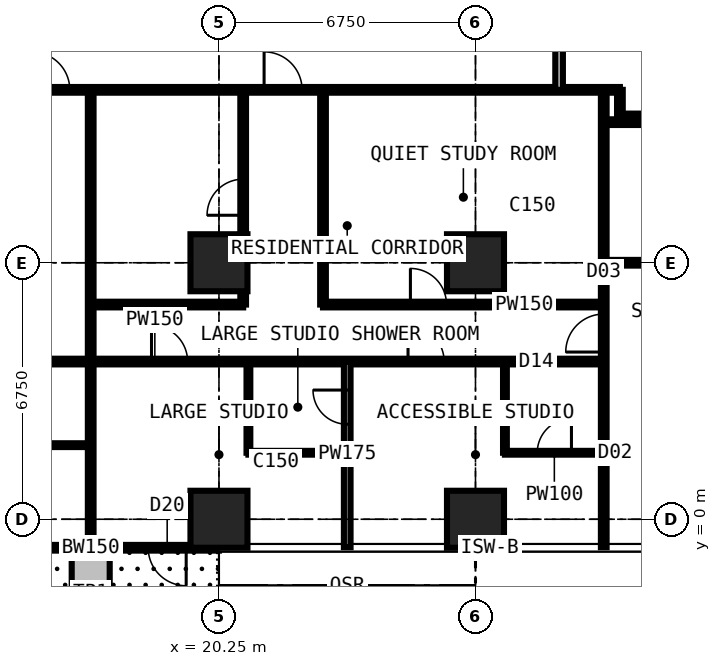
"""IFC4 building model, lengths in metres.
Left out: names, types, materials, properties, quantities, classifications, styles, units other than length and angle.
Written with IfcOpenShell. Run it as: python <this file> out.ifc"""

import sys

from ifc_helpers import new_model, si_unit, direction, frame, frame_2d, origin, origin_2d, place, context, subcontext, project, spatial, rectangle, extrude, element, fill, save


model = new_model("IFC4")
c1 = context("Model", 3, precision=1e-05, world=origin(), true_north=direction((0.0, 1.0)))
c2 = subcontext(c1, "Body", "Model", "MODEL_VIEW")
j1 = project(units=[si_unit("LENGTHUNIT", "METRE"), si_unit("PLANEANGLEUNIT", "RADIAN")], contexts=[c1])
p1 = place(None, origin())
s1 = spatial("IfcSite", under=j1, at=p1, CompositionType="ELEMENT")
p2 = place(p1, origin())
s2 = spatial("IfcBuilding", under=s1, at=p2, CompositionType="ELEMENT")
p3 = place(p2, frame((0.0, 0.0, 130.5)))
s3 = spatial("IfcBuildingStorey", under=s2, at=p3, CompositionType="ELEMENT", Elevation=130.5)
for number, where, z_axis, x_axis in (
    (1, (20.25, 0.0, 0.0), (0.0, 0.0, 1.0), (1.0, 0.0, 0.0)),
    (2, (20.25, 6.75, 0.0), (0.0, 0.0, 1.0), (1.0, 0.0, 0.0)),
    (3, (27.0, 0.0, 0.0), (0.0, 0.0, 1.0), (1.0, 0.0, 0.0)),
    (4, (27.0, 6.75, 0.0), (0.0, 0.0, 1.0), (1.0, 0.0, 0.0)),
):
    element("IfcColumn", number, at=place(p3, frame(where, z_axis=z_axis, x_axis=x_axis)), inside=s3, PredefinedType="COLUMN", context=c2, shape_type="SweptSolid", body=[
        extrude(rectangle(XDim=1.5, YDim=1.5, at=origin_2d()), origin(), (0.0, 0.0, 1.0), 3.6),
    ])
p4 = place(p3, frame((20.25, -0.75, 0.0), z_axis=(0.0, 0.0, 1.0), x_axis=(-1.0, 0.0, 0.0)))
e5 = element("IfcWall", 5, at=p4, inside=s3, PredefinedType="SOLIDWALL", context=c2, shape_type="SweptSolid", body=[
    extrude(rectangle(XDim=6.75, YDim=0.15, at=frame_2d((3.375, 0.0))), origin(), (0.0, 0.0, 1.0), 3.375),
])
p5 = place(p4, frame((0.863, 0.0, 0.0)))
e6 = element("IfcOpeningElement", 6, at=p5, cuts=e5, PredefinedType="OPENING", context=c2, shape_type="SweptSolid", body=[
    extrude(rectangle(XDim=1.0, YDim=2.2, at=frame_2d((0.5, 1.1))), frame((0.0, 0.085, 0.0), z_axis=(0.0, -1.0, 0.0), x_axis=(1.0, 0.0, 0.0)), (0.0, 0.0, 1.0), 0.17),
])
p6 = place(p4, frame((1.975, 0.0, 0.9)))
e7 = element("IfcOpeningElement", 7, at=p6, cuts=e5, PredefinedType="OPENING", context=c2, shape_type="SweptSolid", body=[
    extrude(rectangle(XDim=1.2, YDim=1.8, at=frame_2d((0.6, 0.9))), frame((0.0, 0.085, 0.0), z_axis=(0.0, -1.0, 0.0), x_axis=(1.0, 0.0, 0.0)), (0.0, 0.0, 1.0), 0.17),
])
p7 = place(p4, frame((4.887, 0.0, 0.0)))
e8 = element("IfcOpeningElement", 8, at=p7, cuts=e5, PredefinedType="OPENING", context=c2, shape_type="SweptSolid", body=[
    extrude(rectangle(XDim=1.0, YDim=2.2, at=frame_2d((0.5, 1.1))), frame((0.0, 0.085, 0.0), z_axis=(0.0, -1.0, 0.0), x_axis=(1.0, 0.0, 0.0)), (0.0, 0.0, 1.0), 0.17),
])
p8 = place(p4, frame((3.575, 0.0, 0.9)))
e9 = element("IfcOpeningElement", 9, at=p8, cuts=e5, PredefinedType="OPENING", context=c2, shape_type="SweptSolid", body=[
    extrude(rectangle(XDim=1.2, YDim=1.8, at=frame_2d((0.6, 0.9))), frame((0.0, 0.085, 0.0), z_axis=(0.0, -1.0, 0.0), x_axis=(1.0, 0.0, 0.0)), (0.0, 0.0, 1.0), 0.17),
])
p9 = place(p3, frame((16.875, -0.85, 0.0), z_axis=(0.0, 0.0, 1.0), x_axis=(0.0, -1.0, 0.0)))
e10 = element("IfcWall", 10, at=p9, inside=s3, PredefinedType="USERDEFINED", context=c2, shape_type="SweptSolid", body=[
    extrude(rectangle(XDim=2.2, YDim=1.0, at=frame_2d((1.1, 0.0))), origin(), (0.0, 0.0, 1.0), 0.9),
])
p10 = place(p3, frame((6.75, 4.15, 0.0), z_axis=(0.0, 0.0, 1.0), x_axis=(1.0, 0.0, 0.0)))
e11 = element("IfcWall", 11, at=p10, inside=s3, PredefinedType="PARTITIONING", context=c2, shape_type="SweptSolid", body=[
    extrude(rectangle(XDim=23.625, YDim=0.15, at=frame_2d((11.812, 0.0))), origin(), (0.0, 0.0, 1.0), 3.375),
])
p11 = place(p10, frame((1.2, 0.0, 0.0)))
e12 = element("IfcOpeningElement", 12, at=p11, cuts=e11, PredefinedType="OPENING", context=c2, shape_type="SweptSolid", body=[
    extrude(rectangle(XDim=1.0, YDim=2.2, at=frame_2d((0.5, 1.1))), frame((0.0, 0.085, 0.0), z_axis=(0.0, -1.0, 0.0), x_axis=(1.0, 0.0, 0.0)), (0.0, 0.0, 1.0), 0.17),
])
p12 = place(p10, frame((3.575, 0.0, 0.0)))
e13 = element("IfcOpeningElement", 13, at=p12, cuts=e11, PredefinedType="OPENING", context=c2, shape_type="SweptSolid", body=[
    extrude(rectangle(XDim=0.95, YDim=2.2, at=frame_2d((0.475, 1.1))), frame((0.0, 0.085, 0.0), z_axis=(0.0, -1.0, 0.0), x_axis=(1.0, 0.0, 0.0)), (0.0, 0.0, 1.0), 0.17),
])
p13 = place(p10, frame((7.0, 0.0, 0.0)))
e14 = element("IfcOpeningElement", 14, at=p13, cuts=e11, PredefinedType="OPENING", context=c2, shape_type="SweptSolid", body=[
    extrude(rectangle(XDim=0.95, YDim=2.2, at=frame_2d((0.475, 1.1))), frame((0.0, 0.085, 0.0), z_axis=(0.0, -1.0, 0.0), x_axis=(1.0, 0.0, 0.0)), (0.0, 0.0, 1.0), 0.17),
])
p14 = place(p10, frame((18.475, 0.0, 0.0)))
e15 = element("IfcOpeningElement", 15, at=p14, cuts=e11, PredefinedType="OPENING", context=c2, shape_type="SweptSolid", body=[
    extrude(rectangle(XDim=0.95, YDim=2.2, at=frame_2d((0.475, 1.1))), frame((0.0, 0.085, 0.0), z_axis=(0.0, -1.0, 0.0), x_axis=(1.0, 0.0, 0.0)), (0.0, 0.0, 1.0), 0.17),
])
p15 = place(p10, frame((11.725, 0.0, 0.0)))
e16 = element("IfcOpeningElement", 16, at=p15, cuts=e11, PredefinedType="OPENING", context=c2, shape_type="SweptSolid", body=[
    extrude(rectangle(XDim=0.95, YDim=2.2, at=frame_2d((0.475, 1.1))), frame((0.0, 0.085, 0.0), z_axis=(0.0, -1.0, 0.0), x_axis=(1.0, 0.0, 0.0)), (0.0, 0.0, 1.0), 0.17),
])
p16 = place(p3, frame((10.125, 11.3, 0.0), z_axis=(0.0, 0.0, 1.0), x_axis=(1.0, 0.0, 0.0)))
e17 = element("IfcWall", 17, at=p16, inside=s3, PredefinedType="PARTITIONING", context=c2, shape_type="SweptSolid", body=[
    extrude(rectangle(XDim=20.675, YDim=0.15, at=frame_2d((10.337, 0.0))), origin(), (0.0, 0.0, 1.0), 3.375),
])
p17 = place(p16, frame((5.2, 0.0, 0.0)))
e18 = element("IfcOpeningElement", 18, at=p17, cuts=e17, PredefinedType="OPENING", context=c2, shape_type="SweptSolid", body=[
    extrude(rectangle(XDim=1.0, YDim=2.2, at=frame_2d((0.5, 1.1))), frame((0.0, 0.085, 0.0), z_axis=(0.0, -1.0, 0.0), x_axis=(1.0, 0.0, 0.0)), (0.0, 0.0, 1.0), 0.17),
])
p18 = place(p16, frame((11.312, 0.0, 0.0)))
e19 = element("IfcOpeningElement", 19, at=p18, cuts=e17, PredefinedType="OPENING", context=c2, shape_type="SweptSolid", body=[
    extrude(rectangle(XDim=1.0, YDim=2.2, at=frame_2d((0.5, 1.1))), frame((0.0, 0.085, 0.0), z_axis=(0.0, -1.0, 0.0), x_axis=(1.0, 0.0, 0.0)), (0.0, 0.0, 1.0), 0.17),
])
p19 = place(p16, frame((3.225, 0.0, 0.0)))
e20 = element("IfcOpeningElement", 20, at=p19, cuts=e17, PredefinedType="OPENING", context=c2, shape_type="SweptSolid", body=[
    extrude(rectangle(XDim=0.95, YDim=2.2, at=frame_2d((0.475, 1.1))), frame((0.0, 0.085, 0.0), z_axis=(0.0, -1.0, 0.0), x_axis=(1.0, 0.0, 0.0)), (0.0, 0.0, 1.0), 0.17),
])
p20 = place(p3, frame((14.875, 1.95, 0.0), z_axis=(0.0, 0.0, 1.0), x_axis=(1.0, 0.0, 0.0)))
e21 = element("IfcWall", 21, at=p20, inside=s3, PredefinedType="PARTITIONING", context=c2, shape_type="SweptSolid", body=[
    extrude(rectangle(XDim=2.0, YDim=0.1, at=frame_2d((1.0, 0.0))), origin(), (0.0, 0.0, 1.0), 3.375),
])
p21 = place(p3, frame((16.875, -0.734, 0.0), z_axis=(0.0, 0.0, 1.0), x_axis=(0.0, 1.0, 0.0)))
e22 = element("IfcWall", 22, at=p21, inside=s3, PredefinedType="PARTITIONING", context=c2, shape_type="SweptSolid", body=[
    extrude(rectangle(XDim=12.034, YDim=0.15, at=frame_2d((6.017, 0.0))), origin(), (0.0, 0.0, 1.0), 3.375),
])
p22 = place(p3, frame((16.875, 5.65, 0.0), z_axis=(0.0, 0.0, 1.0), x_axis=(1.0, 0.0, 0.0)))
e23 = element("IfcWall", 23, at=p22, inside=s3, PredefinedType="PARTITIONING", context=c2, shape_type="SweptSolid", body=[
    extrude(rectangle(XDim=4.012, YDim=0.15, at=frame_2d((2.006, 0.0))), origin(), (0.0, 0.0, 1.0), 3.375),
])
p23 = place(p3, frame((20.887, 5.65, 0.0), z_axis=(0.0, 0.0, 1.0), x_axis=(0.0, 1.0, 0.0)))
e24 = element("IfcWall", 24, at=p23, inside=s3, PredefinedType="PARTITIONING", context=c2, shape_type="SweptSolid", body=[
    extrude(rectangle(XDim=5.65, YDim=0.15, at=frame_2d((2.825, 0.0))), origin(), (0.0, 0.0, 1.0), 3.375),
])
p24 = place(p23, frame((2.35, 0.0, 0.0)))
e25 = element("IfcOpeningElement", 25, at=p24, cuts=e24, PredefinedType="OPENING", context=c2, shape_type="SweptSolid", body=[
    extrude(rectangle(XDim=0.95, YDim=2.2, at=frame_2d((0.475, 1.1))), frame((0.0, 0.085, 0.0), z_axis=(0.0, -1.0, 0.0), x_axis=(1.0, 0.0, 0.0)), (0.0, 0.0, 1.0), 0.17),
])
p25 = place(p3, frame((21.025, 1.75, 0.0), z_axis=(0.0, 0.0, 1.0), x_axis=(0.0, 1.0, 0.0)))
e26 = element("IfcWall", 26, at=p25, inside=s3, PredefinedType="PARTITIONING", context=c2, shape_type="SweptSolid", body=[
    extrude(rectangle(XDim=2.4, YDim=0.1, at=frame_2d((1.2, 0.0))), origin(), (0.0, 0.0, 1.0), 3.375),
])
p26 = place(p3, frame((21.025, 1.75, 0.0), z_axis=(0.0, 0.0, 1.0), x_axis=(1.0, 0.0, 0.0)))
e27 = element("IfcWall", 27, at=p26, inside=s3, PredefinedType="PARTITIONING", context=c2, shape_type="SweptSolid", body=[
    extrude(rectangle(XDim=2.6, YDim=0.1, at=frame_2d((1.3, 0.0))), origin(), (0.0, 0.0, 1.0), 3.375),
])
p27 = place(p3, frame((22.988, 5.65, 0.0), z_axis=(0.0, 0.0, 1.0), x_axis=(1.0, 0.0, 0.0)))
e28 = element("IfcWall", 28, at=p27, inside=s3, PredefinedType="PARTITIONING", context=c2, shape_type="SweptSolid", body=[
    extrude(rectangle(XDim=7.387, YDim=0.15, at=frame_2d((3.694, 0.0))), origin(), (0.0, 0.0, 1.0), 3.375),
])
p28 = place(p27, frame((2.3, 0.0, 0.0)))
e29 = element("IfcOpeningElement", 29, at=p28, cuts=e28, PredefinedType="OPENING", context=c2, shape_type="SweptSolid", body=[
    extrude(rectangle(XDim=0.95, YDim=2.2, at=frame_2d((0.475, 1.1))), frame((0.0, 0.085, 0.0), z_axis=(0.0, -1.0, 0.0), x_axis=(1.0, 0.0, 0.0)), (0.0, 0.0, 1.0), 0.17),
])
p29 = place(p3, frame((22.988, 5.65, 0.0), z_axis=(0.0, 0.0, 1.0), x_axis=(0.0, 1.0, 0.0)))
e30 = element("IfcWall", 30, at=p29, inside=s3, PredefinedType="PARTITIONING", context=c2, shape_type="SweptSolid", body=[
    extrude(rectangle(XDim=5.65, YDim=0.15, at=frame_2d((2.825, 0.0))), origin(), (0.0, 0.0, 1.0), 3.375),
])
p30 = place(p3, frame((23.625, -0.734, 0.0), z_axis=(0.0, 0.0, 1.0), x_axis=(0.0, 1.0, 0.0)))
e31 = element("IfcWall", 31, at=p30, inside=s3, PredefinedType="PARTITIONING", context=c2, shape_type="SweptSolid", body=[
    extrude(rectangle(XDim=4.884, YDim=0.175, at=frame_2d((2.442, 0.0))), origin(), (0.0, 0.0, 1.0), 3.375),
])
p31 = place(p30, frame((3.234, 0.0, 0.0)))
e32 = element("IfcOpeningElement", 32, at=p31, cuts=e31, PredefinedType="OPENING", context=c2, shape_type="SweptSolid", body=[
    extrude(rectangle(XDim=0.9, YDim=2.2, at=frame_2d((0.45, 1.1))), frame((0.0, 0.097, 0.0), z_axis=(0.0, -1.0, 0.0), x_axis=(1.0, 0.0, 0.0)), (0.0, 0.0, 1.0), 0.195),
])
p32 = place(p3, frame((27.775, 1.75, 0.0), z_axis=(0.0, 0.0, 1.0), x_axis=(0.0, 1.0, 0.0)))
e33 = element("IfcWall", 33, at=p32, inside=s3, PredefinedType="PARTITIONING", context=c2, shape_type="SweptSolid", body=[
    extrude(rectangle(XDim=2.4, YDim=0.1, at=frame_2d((1.2, 0.0))), origin(), (0.0, 0.0, 1.0), 3.375),
])
p33 = place(p3, frame((27.775, 1.75, 0.0), z_axis=(0.0, 0.0, 1.0), x_axis=(1.0, 0.0, 0.0)))
e34 = element("IfcWall", 34, at=p33, inside=s3, PredefinedType="PARTITIONING", context=c2, shape_type="SweptSolid", body=[
    extrude(rectangle(XDim=2.6, YDim=0.1, at=frame_2d((1.3, 0.0))), origin(), (0.0, 0.0, 1.0), 3.375),
])
p34 = place(p33, frame((0.85, 0.0, 0.0)))
e35 = element("IfcOpeningElement", 35, at=p34, cuts=e34, PredefinedType="OPENING", context=c2, shape_type="SweptSolid", body=[
    extrude(rectangle(XDim=0.9, YDim=2.2, at=frame_2d((0.45, 1.1))), frame((0.0, 0.06, 0.0), z_axis=(0.0, -1.0, 0.0), x_axis=(1.0, 0.0, 0.0)), (0.0, 0.0, 1.0), 0.12),
])
p35 = place(p3, frame((29.2, 11.3, 0.0), z_axis=(0.0, 0.0, 1.0), x_axis=(0.0, 1.0, 0.0)))
e36 = element("IfcWall", 36, at=p35, inside=s3, PredefinedType="PARTITIONING", context=c2, shape_type="SweptSolid", body=[
    extrude(rectangle(XDim=17.9, YDim=0.2, at=frame_2d((8.95, 0.0))), origin(), (0.0, 0.0, 1.0), 3.375),
])
p36 = place(p35, frame((8.35, 0.0, 0.0)))
e37 = element("IfcOpeningElement", 37, at=p36, cuts=e36, PredefinedType="OPENING", context=c2, shape_type="SweptSolid", body=[
    extrude(rectangle(XDim=1.2, YDim=2.2, at=frame_2d((0.6, 1.1))), frame((0.0, 0.11, 0.0), z_axis=(0.0, -1.0, 0.0), x_axis=(1.0, 0.0, 0.0)), (0.0, 0.0, 1.0), 0.22),
])
p37 = place(p3, frame((30.375, -0.734, 0.0), z_axis=(0.0, 0.0, 1.0), x_axis=(0.0, 1.0, 0.0)))
e38 = element("IfcWall", 38, at=p37, inside=s3, PredefinedType="PARTITIONING", context=c2, shape_type="SweptSolid", body=[
    extrude(rectangle(XDim=12.034, YDim=0.15, at=frame_2d((6.017, 0.0))), origin(), (0.0, 0.0, 1.0), 3.375),
])
p38 = place(p37, frame((5.134, 0.0, 0.0)))
e39 = element("IfcOpeningElement", 39, at=p38, cuts=e38, PredefinedType="OPENING", context=c2, shape_type="SweptSolid", body=[
    extrude(rectangle(XDim=1.0, YDim=2.2, at=frame_2d((0.5, 1.1))), frame((0.0, 0.085, 0.0), z_axis=(0.0, -1.0, 0.0), x_axis=(1.0, 0.0, 0.0)), (0.0, 0.0, 1.0), 0.17),
])
p39 = place(p3, frame((30.375, 6.75, 0.0), z_axis=(0.0, 0.0, 1.0), x_axis=(1.0, 0.0, 0.0)))
e40 = element("IfcWall", 40, at=p39, inside=s3, PredefinedType="PARTITIONING", context=c2, shape_type="SweptSolid", body=[
    extrude(rectangle(XDim=5.975, YDim=0.15, at=frame_2d((2.988, 0.0))), origin(), (0.0, 0.0, 1.0), 2.877),
])
p40 = place(p3, frame((30.375, 10.45, 0.0), z_axis=(0.0, 0.0, 1.0), x_axis=(1.0, 0.0, 0.0)))
e41 = element("IfcWall", 41, at=p40, inside=s3, PredefinedType="PARTITIONING", context=c2, shape_type="SweptSolid", body=[
    extrude(rectangle(XDim=4.475, YDim=0.15, at=frame_2d((2.238, 0.0))), origin(), (0.0, 0.0, 1.0), 3.375),
])
p41 = place(p40, frame((2.35, 0.0, 0.0)))
e42 = element("IfcOpeningElement", 42, at=p41, cuts=e41, PredefinedType="OPENING", context=c2, shape_type="SweptSolid", body=[
    extrude(rectangle(XDim=0.95, YDim=2.2, at=frame_2d((0.475, 1.1))), frame((0.0, 0.085, 0.0), z_axis=(0.0, -1.0, 0.0), x_axis=(1.0, 0.0, 0.0)), (0.0, 0.0, 1.0), 0.17),
])
p42 = place(p3, frame((30.8, 10.6, 0.0), z_axis=(0.0, 0.0, 1.0), x_axis=(0.0, 1.0, 0.0)))
e43 = element("IfcWall", 43, at=p42, inside=s3, PredefinedType="PARTITIONING", context=c2, shape_type="SweptSolid", body=[
    extrude(rectangle(XDim=0.7, YDim=0.15, at=frame_2d((0.35, 0.0))), origin(), (0.0, 0.0, 1.0), 3.375),
])
p43 = place(p3, frame((30.8, 10.6, 0.0), z_axis=(0.0, 0.0, 1.0), x_axis=(1.0, 0.0, 0.0)))
e44 = element("IfcWall", 44, at=p43, inside=s3, PredefinedType="PARTITIONING", context=c2, shape_type="SweptSolid", body=[
    extrude(rectangle(XDim=1.85, YDim=0.15, at=frame_2d((0.925, 0.0))), origin(), (0.0, 0.0, 1.0), 3.375),
])
p44 = place(p5, origin())
e45 = element("IfcDoor", 45, at=p44, inside=s3, OperationType="SINGLE_SWING_LEFT", PredefinedType="DOOR", context=c2, shape_type="SweptSolid", body=[
    extrude(rectangle(XDim=1.0, YDim=2.2, at=frame_2d((0.5, 1.1))), frame((0.0, 0.025, 0.0), z_axis=(0.0, -1.0, 0.0), x_axis=(1.0, 0.0, 0.0)), (0.0, 0.0, 1.0), 0.05),
])
fill(e6, e45)
p45 = place(p6, origin())
e46 = element("IfcWindow", 46, at=p45, inside=s3, PartitioningType="SINGLE_PANEL", PredefinedType="WINDOW", context=c2, shape_type="SweptSolid", body=[
    extrude(rectangle(XDim=1.2, YDim=1.8, at=frame_2d((0.6, 0.9))), frame((0.0, 0.03, 0.0), z_axis=(0.0, -1.0, 0.0), x_axis=(1.0, 0.0, 0.0)), (0.0, 0.0, 1.0), 0.06),
])
fill(e7, e46)
p46 = place(p8, origin())
e47 = element("IfcWindow", 47, at=p46, inside=s3, PartitioningType="SINGLE_PANEL", PredefinedType="WINDOW", context=c2, shape_type="SweptSolid", body=[
    extrude(rectangle(XDim=1.2, YDim=1.8, at=frame_2d((0.6, 0.9))), frame((0.0, 0.03, 0.0), z_axis=(0.0, -1.0, 0.0), x_axis=(1.0, 0.0, 0.0)), (0.0, 0.0, 1.0), 0.06),
])
fill(e9, e47)
p47 = place(p17, origin())
e48 = element("IfcDoor", 48, at=p47, inside=s3, OperationType="SINGLE_SWING_LEFT", PredefinedType="DOOR", context=c2, shape_type="SweptSolid", body=[
    extrude(rectangle(XDim=1.0, YDim=2.2, at=frame_2d((0.5, 1.1))), frame((0.0, 0.025, 0.0), z_axis=(0.0, -1.0, 0.0), x_axis=(1.0, 0.0, 0.0)), (0.0, 0.0, 1.0), 0.05),
])
fill(e18, e48)
p48 = place(p14, origin())
e49 = element("IfcDoor", 49, at=p48, inside=s3, OperationType="SINGLE_SWING_LEFT", PredefinedType="DOOR", context=c2, shape_type="SweptSolid", body=[
    extrude(rectangle(XDim=0.95, YDim=2.2, at=frame_2d((0.475, 1.1))), frame((0.0, 0.025, 0.0), z_axis=(0.0, -1.0, 0.0), x_axis=(1.0, 0.0, 0.0)), (0.0, 0.0, 1.0), 0.05),
])
fill(e15, e49)
p49 = place(p34, origin())
e50 = element("IfcDoor", 50, at=p49, inside=s3, OperationType="SINGLE_SWING_RIGHT", PredefinedType="DOOR", context=c2, shape_type="SweptSolid", body=[
    extrude(rectangle(XDim=0.9, YDim=2.2, at=frame_2d((0.45, 1.1))), frame((0.0, 0.025, 0.0), z_axis=(0.0, -1.0, 0.0), x_axis=(1.0, 0.0, 0.0)), (0.0, 0.0, 1.0), 0.05),
])
fill(e35, e50)
p50 = place(p15, origin())
e51 = element("IfcDoor", 51, at=p50, inside=s3, OperationType="SINGLE_SWING_LEFT", PredefinedType="DOOR", context=c2, shape_type="SweptSolid", body=[
    extrude(rectangle(XDim=0.95, YDim=2.2, at=frame_2d((0.475, 1.1))), frame((0.0, 0.025, 0.0), z_axis=(0.0, -1.0, 0.0), x_axis=(1.0, 0.0, 0.0)), (0.0, 0.0, 1.0), 0.05),
])
fill(e16, e51)
p51 = place(p31, origin())
e52 = element("IfcDoor", 52, at=p51, inside=s3, OperationType="SINGLE_SWING_RIGHT", PredefinedType="DOOR", context=c2, shape_type="SweptSolid", body=[
    extrude(rectangle(XDim=0.9, YDim=2.2, at=frame_2d((0.45, 1.1))), frame((0.0, 0.025, 0.0), z_axis=(0.0, -1.0, 0.0), x_axis=(1.0, 0.0, 0.0)), (0.0, 0.0, 1.0), 0.05),
])
fill(e32, e52)
p52 = place(p18, origin())
e53 = element("IfcDoor", 53, at=p52, inside=s3, OperationType="SINGLE_SWING_LEFT", PredefinedType="DOOR", context=c2, shape_type="SweptSolid", body=[
    extrude(rectangle(XDim=1.0, YDim=2.2, at=frame_2d((0.5, 1.1))), frame((0.0, 0.025, 0.0), z_axis=(0.0, -1.0, 0.0), x_axis=(1.0, 0.0, 0.0)), (0.0, 0.0, 1.0), 0.05),
])
fill(e19, e53)
p53 = place(p28, origin())
e54 = element("IfcDoor", 54, at=p53, inside=s3, OperationType="SINGLE_SWING_LEFT", PredefinedType="DOOR", context=c2, shape_type="SweptSolid", body=[
    extrude(rectangle(XDim=0.95, YDim=2.2, at=frame_2d((0.475, 1.1))), frame((0.0, 0.025, 0.0), z_axis=(0.0, -1.0, 0.0), x_axis=(1.0, 0.0, 0.0)), (0.0, 0.0, 1.0), 0.05),
])
fill(e29, e54)
p54 = place(p24, origin())
e55 = element("IfcDoor", 55, at=p54, inside=s3, OperationType="SINGLE_SWING_LEFT", PredefinedType="DOOR", context=c2, shape_type="SweptSolid", body=[
    extrude(rectangle(XDim=0.95, YDim=2.2, at=frame_2d((0.475, 1.1))), frame((0.0, 0.025, 0.0), z_axis=(0.0, -1.0, 0.0), x_axis=(1.0, 0.0, 0.0)), (0.0, 0.0, 1.0), 0.05),
])
fill(e25, e55)
p55 = place(p38, origin())
e56 = element("IfcDoor", 56, at=p55, inside=s3, OperationType="SINGLE_SWING_LEFT", PredefinedType="DOOR", context=c2, shape_type="SweptSolid", body=[
    extrude(rectangle(XDim=1.0, YDim=2.2, at=frame_2d((0.5, 1.1))), frame((0.0, 0.025, 0.0), z_axis=(0.0, -1.0, 0.0), x_axis=(1.0, 0.0, 0.0)), (0.0, 0.0, 1.0), 0.05),
])
fill(e39, e56)
save(model, sys.argv[1])
